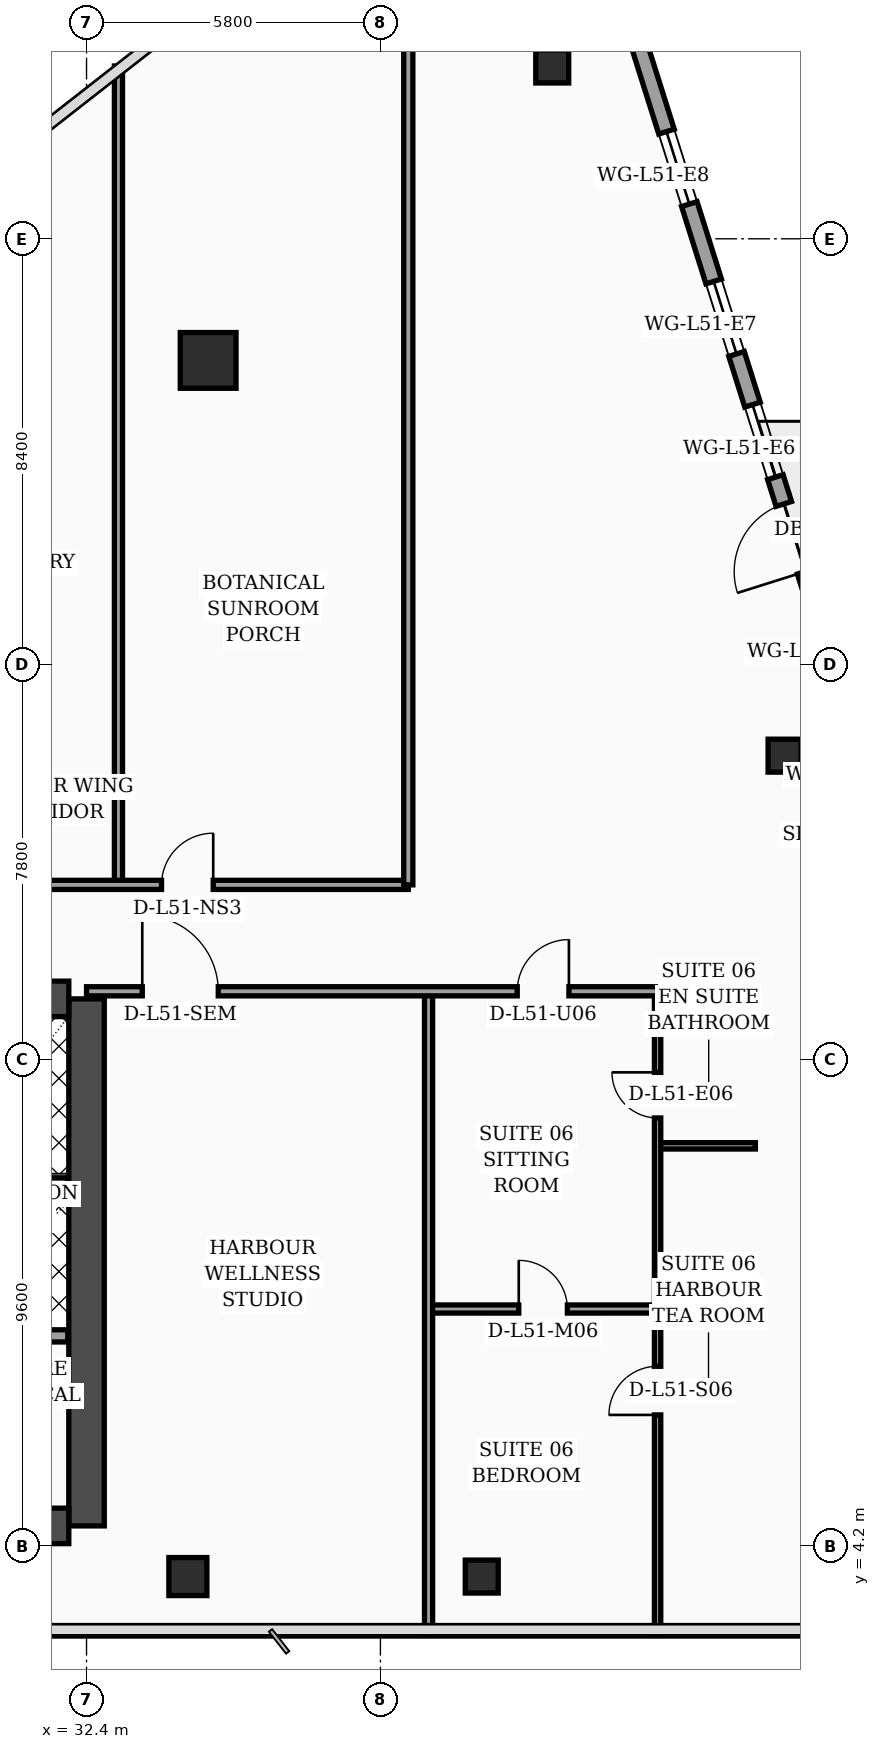
"""IFC4 building model, lengths in metres.
Left out: names, types, materials, properties, quantities, classifications, styles, units other than length and angle.
Written with IfcOpenShell. Run it as: python <this file> out.ifc"""

import sys

from ifc_helpers import new_model, si_unit, direction, frame, frame_2d, origin, origin_2d, place, context, subcontext, project, spatial, rectangle, hollow_rectangle, circle, extrude, element, fill, save


model = new_model("IFC4")
c1 = context("Model", 3, precision=1e-05, world=origin(), true_north=direction((0.0, 1.0)))
c2 = subcontext(c1, "Body", "Model", "MODEL_VIEW")
j1 = project(units=[si_unit("LENGTHUNIT", "METRE"), si_unit("PLANEANGLEUNIT", "RADIAN")], contexts=[c1])
p1 = place(None, origin())
s1 = spatial("IfcSite", under=j1, at=p1, CompositionType="ELEMENT")
p2 = place(p1, origin())
s2 = spatial("IfcBuilding", under=s1, at=p2, CompositionType="ELEMENT")
p3 = place(p2, frame((0.0, 0.0, 207.2)))
s3 = spatial("IfcBuildingStorey", under=s2, at=p3, CompositionType="ELEMENT", Elevation=207.2)
p4 = place(p3, frame((32.4, 4.6, 0.0), z_axis=(0.0, 0.0, 1.0), x_axis=(0.0, 1.0, 0.0)))
e1 = element("IfcWall", 1, at=p4, inside=s3, PredefinedType="SHEAR", context=c2, shape_type="SweptSolid", body=[
    extrude(rectangle(XDim=10.4, YDim=0.7, at=frame_2d((5.2, 0.0))), origin(), (0.0, 0.0, 1.0), 3.56),
])
p5 = place(p3, frame((21.95, 15.0, 0.0), z_axis=(0.0, 0.0, 1.0), x_axis=(1.0, 0.0, 0.0)))
e2 = element("IfcWall", 2, at=p5, inside=s3, PredefinedType="SHEAR", context=c2, shape_type="SweptSolid", body=[
    extrude(rectangle(XDim=10.1, YDim=0.7, at=frame_2d((5.05, 0.0))), origin(), (0.0, 0.0, 1.0), 3.56),
])
p6 = place(p5, frame((4.95, 0.0, 0.0)))
e3 = element("IfcOpeningElement", 3, at=p6, cuts=e2, PredefinedType="OPENING", context=c2, shape_type="SweptSolid", body=[
    extrude(rectangle(XDim=1.1, YDim=2.2, at=frame_2d((0.55, 1.1))), frame((0.0, 0.36, 0.0), z_axis=(0.0, -1.0, 0.0), x_axis=(1.0, 0.0, 0.0)), (0.0, 0.0, 1.0), 0.72),
])
p7 = place(p3, frame((21.95, 4.6, 0.0), z_axis=(0.0, 0.0, 1.0), x_axis=(1.0, 0.0, 0.0)))
e4 = element("IfcWall", 4, at=p7, inside=s3, PredefinedType="SHEAR", context=c2, shape_type="SweptSolid", body=[
    extrude(rectangle(XDim=10.1, YDim=0.7, at=frame_2d((5.05, 0.0))), origin(), (0.0, 0.0, 1.0), 3.56),
])
p8 = place(p3, frame((34.4, 3.6, 0.0), z_axis=(0.0, 0.0, 1.0), x_axis=(1.0, 0.0, 0.0)))
e5 = element("IfcColumn", 5, at=p8, inside=s3, PredefinedType="COLUMN", context=c2, shape_type="SweptSolid", body=[
    extrude(hollow_rectangle(XDim=0.75, YDim=0.75, WallThickness=0.032, at=origin_2d()), origin(), (0.0, 0.0, 1.0), 3.56),
])
p9 = place(p3, frame((40.2, 3.6, 0.0), z_axis=(0.0, 0.0, 1.0), x_axis=(1.0, 0.0, 0.0)))
e6 = element("IfcColumn", 6, at=p9, inside=s3, PredefinedType="COLUMN", context=c2, shape_type="SweptSolid", body=[
    extrude(hollow_rectangle(XDim=0.65, YDim=0.65, WallThickness=0.028, at=origin_2d()), origin(), (0.0, 0.0, 1.0), 3.56),
])
p10 = place(p3, frame((34.8, 27.6, 0.0), z_axis=(0.0, 0.0, 1.0), x_axis=(1.0, 0.0, 0.0)))
e7 = element("IfcColumn", 7, at=p10, inside=s3, PredefinedType="COLUMN", context=c2, shape_type="SweptSolid", body=[
    extrude(circle(Radius=0.55, at=origin_2d()), origin(), (0.0, 0.0, 1.0), 3.56),
])
for number, where, z_axis, x_axis in (
    (8, (46.176, 19.8, 0.0), (0.0, 0.0, 1.0), (1.0, 0.0, 0.0)),
    (9, (41.591, 33.4, 0.0), (0.0, 0.0, 1.0), (1.0, 0.0, 0.0)),
):
    element("IfcColumn", number, at=place(p3, frame(where, z_axis=z_axis, x_axis=x_axis)), inside=s3, PredefinedType="COLUMN", context=c2, shape_type="SweptSolid", body=[
        extrude(hollow_rectangle(XDim=0.65, YDim=0.65, WallThickness=0.028, at=origin_2d()), origin(), (0.0, 0.0, 1.0), 3.56),
    ])
p11 = place(p3, frame((52.23, 5.505, 0.0), z_axis=(0.0, 0.0, 1.0), x_axis=(-0.300509063924, 0.953778958931, 0.0)))
e10 = element("IfcWall", 10, at=p11, inside=s3, PredefinedType="SOLIDWALL", context=c2, shape_type="SweptSolid", body=[
    extrude(rectangle(XDim=30.814, YDim=0.32, at=frame_2d((15.407, 0.0))), origin(), (0.0, 0.0, 1.0), 3.56),
])
p12 = place(p11, frame((18.796, 0.0, 0.0)))
e11 = element("IfcOpeningElement", 11, at=p12, cuts=e10, PredefinedType="OPENING", context=c2, shape_type="SweptSolid", body=[
    extrude(rectangle(XDim=1.4, YDim=2.25, at=frame_2d((0.7, 1.125))), frame((0.0, 0.17, 0.0), z_axis=(0.0, -1.0, 0.0), x_axis=(1.0, 0.0, 0.0)), (0.0, 0.0, 1.0), 0.34),
])
p13 = place(p11, frame((4.437, 0.0, 0.7)))
e12 = element("IfcOpeningElement", 12, at=p13, cuts=e10, PredefinedType="OPENING", context=c2, shape_type="SweptSolid", body=[
    extrude(rectangle(XDim=1.6, YDim=1.65, at=frame_2d((0.8, 0.825))), frame((0.0, 0.17, 0.0), z_axis=(0.0, -1.0, 0.0), x_axis=(1.0, 0.0, 0.0)), (0.0, 0.0, 1.0), 0.34),
])
p14 = place(p11, frame((9.889, 0.0, 0.7)))
e13 = element("IfcOpeningElement", 13, at=p14, cuts=e10, PredefinedType="OPENING", context=c2, shape_type="SweptSolid", body=[
    extrude(rectangle(XDim=1.6, YDim=1.65, at=frame_2d((0.8, 0.825))), frame((0.0, 0.17, 0.0), z_axis=(0.0, -1.0, 0.0), x_axis=(1.0, 0.0, 0.0)), (0.0, 0.0, 1.0), 0.34),
])
p15 = place(p11, frame((1.6, 0.0, 0.75)))
e14 = element("IfcOpeningElement", 14, at=p15, cuts=e10, PredefinedType="OPENING", context=c2, shape_type="SweptSolid", body=[
    extrude(rectangle(XDim=1.5, YDim=1.6, at=frame_2d((0.75, 0.8))), frame((0.0, 0.17, 0.0), z_axis=(0.0, -1.0, 0.0), x_axis=(1.0, 0.0, 0.0)), (0.0, 0.0, 1.0), 0.34),
])
p16 = place(p11, frame((7.8, 0.0, 0.75)))
e15 = element("IfcOpeningElement", 15, at=p16, cuts=e10, PredefinedType="OPENING", context=c2, shape_type="SweptSolid", body=[
    extrude(rectangle(XDim=1.5, YDim=1.6, at=frame_2d((0.75, 0.8))), frame((0.0, 0.17, 0.0), z_axis=(0.0, -1.0, 0.0), x_axis=(1.0, 0.0, 0.0)), (0.0, 0.0, 1.0), 0.34),
])
p17 = place(p11, frame((11.95, 0.0, 0.75)))
e16 = element("IfcOpeningElement", 16, at=p17, cuts=e10, PredefinedType="OPENING", context=c2, shape_type="SweptSolid", body=[
    extrude(rectangle(XDim=1.5, YDim=1.6, at=frame_2d((0.75, 0.8))), frame((0.0, 0.17, 0.0), z_axis=(0.0, -1.0, 0.0), x_axis=(1.0, 0.0, 0.0)), (0.0, 0.0, 1.0), 0.34),
])
p18 = place(p11, frame((14.0, 0.0, 0.75)))
e17 = element("IfcOpeningElement", 17, at=p18, cuts=e10, PredefinedType="OPENING", context=c2, shape_type="SweptSolid", body=[
    extrude(rectangle(XDim=1.5, YDim=1.6, at=frame_2d((0.75, 0.8))), frame((0.0, 0.17, 0.0), z_axis=(0.0, -1.0, 0.0), x_axis=(1.0, 0.0, 0.0)), (0.0, 0.0, 1.0), 0.34),
])
p19 = place(p11, frame((16.55, 0.0, 0.75)))
e18 = element("IfcOpeningElement", 18, at=p19, cuts=e10, PredefinedType="OPENING", context=c2, shape_type="SweptSolid", body=[
    extrude(rectangle(XDim=1.5, YDim=1.6, at=frame_2d((0.75, 0.8))), frame((0.0, 0.17, 0.0), z_axis=(0.0, -1.0, 0.0), x_axis=(1.0, 0.0, 0.0)), (0.0, 0.0, 1.0), 0.34),
])
p20 = place(p11, frame((20.75, 0.0, 0.75)))
e19 = element("IfcOpeningElement", 19, at=p20, cuts=e10, PredefinedType="OPENING", context=c2, shape_type="SweptSolid", body=[
    extrude(rectangle(XDim=1.5, YDim=1.6, at=frame_2d((0.75, 0.8))), frame((0.0, 0.17, 0.0), z_axis=(0.0, -1.0, 0.0), x_axis=(1.0, 0.0, 0.0)), (0.0, 0.0, 1.0), 0.34),
])
p21 = place(p11, frame((23.3, 0.0, 0.75)))
e20 = element("IfcOpeningElement", 20, at=p21, cuts=e10, PredefinedType="OPENING", context=c2, shape_type="SweptSolid", body=[
    extrude(rectangle(XDim=1.5, YDim=1.6, at=frame_2d((0.75, 0.8))), frame((0.0, 0.17, 0.0), z_axis=(0.0, -1.0, 0.0), x_axis=(1.0, 0.0, 0.0)), (0.0, 0.0, 1.0), 0.34),
])
p22 = place(p11, frame((26.4, 0.0, 0.75)))
e21 = element("IfcOpeningElement", 21, at=p22, cuts=e10, PredefinedType="OPENING", context=c2, shape_type="SweptSolid", body=[
    extrude(rectangle(XDim=1.5, YDim=1.6, at=frame_2d((0.75, 0.8))), frame((0.0, 0.17, 0.0), z_axis=(0.0, -1.0, 0.0), x_axis=(1.0, 0.0, 0.0)), (0.0, 0.0, 1.0), 0.34),
])
p23 = place(p3, frame((27.02, 11.35, 0.0), z_axis=(0.0, 0.0, 1.0), x_axis=(1.0, 0.0, 0.0)))
e22 = element("IfcWall", 22, at=p23, inside=s3, PredefinedType="SOLIDWALL", context=c2, shape_type="SweptSolid", body=[
    extrude(rectangle(XDim=5.01, YDim=0.24, at=frame_2d((2.505, 0.0))), origin(), (0.0, 0.0, 1.0), 3.56),
])
p24 = place(p23, frame((0.45, 0.0, 0.0)))
e23 = element("IfcOpeningElement", 23, at=p24, cuts=e22, PredefinedType="OPENING", context=c2, shape_type="SweptSolid", body=[
    extrude(rectangle(XDim=1.3, YDim=2.35, at=frame_2d((0.65, 1.175))), frame((0.0, 0.13, 0.0), z_axis=(0.0, -1.0, 0.0), x_axis=(1.0, 0.0, 0.0)), (0.0, 0.0, 1.0), 0.26),
])
p25 = place(p3, frame((27.02, 8.35, 0.0), z_axis=(0.0, 0.0, 1.0), x_axis=(1.0, 0.0, 0.0)))
e24 = element("IfcWall", 24, at=p25, inside=s3, PredefinedType="SOLIDWALL", context=c2, shape_type="SweptSolid", body=[
    extrude(rectangle(XDim=5.01, YDim=0.24, at=frame_2d((2.505, 0.0))), origin(), (0.0, 0.0, 1.0), 3.56),
])
p26 = place(p3, frame((43.67, 12.1, 0.0), z_axis=(0.0, 0.0, 1.0), x_axis=(1.0, 0.0, 0.0)))
e25 = element("IfcWall", 25, at=p26, inside=s3, PredefinedType="PARTITIONING", context=c2, shape_type="SweptSolid", body=[
    extrude(rectangle(XDim=1.93, YDim=0.125, at=frame_2d((0.965, 0.0))), origin(), (0.0, 0.0, 1.0), 3.56),
])
p27 = place(p3, frame((39.15, 8.88, 0.0), z_axis=(0.0, 0.0, 1.0), x_axis=(1.0, 0.0, 0.0)))
e26 = element("IfcWall", 26, at=p27, inside=s3, PredefinedType="PARTITIONING", context=c2, shape_type="SweptSolid", body=[
    extrude(rectangle(XDim=4.52, YDim=0.16, at=frame_2d((2.26, 0.0))), origin(), (0.0, 0.0, 1.0), 3.56),
])
p28 = place(p27, frame((1.78, 0.0, 0.0)))
e27 = element("IfcOpeningElement", 27, at=p28, cuts=e26, PredefinedType="OPENING", context=c2, shape_type="SweptSolid", body=[
    extrude(rectangle(XDim=0.96, YDim=2.2, at=frame_2d((0.48, 1.1))), frame((0.0, 0.09, 0.0), z_axis=(0.0, -1.0, 0.0), x_axis=(1.0, 0.0, 0.0)), (0.0, 0.0, 1.0), 0.18),
])
p29 = place(p3, frame((43.67, 2.44, 0.0), z_axis=(0.0, 0.0, 1.0), x_axis=(0.0, 1.0, 0.0)))
e28 = element("IfcWall", 28, at=p29, inside=s3, PredefinedType="PARTITIONING", context=c2, shape_type="SweptSolid", body=[
    extrude(rectangle(XDim=12.71, YDim=0.125, at=frame_2d((6.355, 0.0))), origin(), (0.0, 0.0, 1.0), 3.09),
])
p30 = place(p29, frame((4.35, 0.0, 0.0)))
e29 = element("IfcOpeningElement", 29, at=p30, cuts=e28, PredefinedType="OPENING", context=c2, shape_type="SweptSolid", body=[
    extrude(rectangle(XDim=0.96, YDim=2.2, at=frame_2d((0.48, 1.1))), frame((0.0, 0.073, 0.0), z_axis=(0.0, -1.0, 0.0), x_axis=(1.0, 0.0, 0.0)), (0.0, 0.0, 1.0), 0.145),
])
p31 = place(p29, frame((10.21, 0.0, 0.0)))
e30 = element("IfcOpeningElement", 30, at=p31, cuts=e28, PredefinedType="OPENING", context=c2, shape_type="SweptSolid", body=[
    extrude(rectangle(XDim=0.9, YDim=2.15, at=frame_2d((0.45, 1.075))), frame((0.0, 0.073, 0.0), z_axis=(0.0, -1.0, 0.0), x_axis=(1.0, 0.0, 0.0)), (0.0, 0.0, 1.0), 0.145),
])
p32 = place(p3, frame((39.15, 2.44, 0.0), z_axis=(0.0, 0.0, 1.0), x_axis=(0.0, 1.0, 0.0)))
e31 = element("IfcWall", 31, at=p32, inside=s3, PredefinedType="PARTITIONING", context=c2, shape_type="SweptSolid", body=[
    extrude(rectangle(XDim=12.71, YDim=0.16, at=frame_2d((6.355, 0.0))), origin(), (0.0, 0.0, 1.0), 2.94),
])
p33 = place(p3, frame((32.4, 15.15, 0.0), z_axis=(0.0, 0.0, 1.0), x_axis=(1.0, 0.0, 0.0)))
e32 = element("IfcWall", 32, at=p33, inside=s3, PredefinedType="PARTITIONING", context=c2, shape_type="SweptSolid", body=[
    extrude(rectangle(XDim=13.2, YDim=0.18, at=frame_2d((6.6, 0.0))), origin(), (0.0, 0.0, 1.0), 2.94),
])
p34 = place(p33, frame((1.1, 0.0, 0.0)))
e33 = element("IfcOpeningElement", 33, at=p34, cuts=e32, PredefinedType="OPENING", context=c2, shape_type="SweptSolid", body=[
    extrude(rectangle(XDim=1.5, YDim=2.22, at=frame_2d((0.75, 1.11))), frame((0.0, 0.1, 0.0), z_axis=(0.0, -1.0, 0.0), x_axis=(1.0, 0.0, 0.0)), (0.0, 0.0, 1.0), 0.2),
])
p35 = place(p33, frame((8.5, 0.0, 0.0)))
e34 = element("IfcOpeningElement", 34, at=p35, cuts=e32, PredefinedType="OPENING", context=c2, shape_type="SweptSolid", body=[
    extrude(rectangle(XDim=1.02, YDim=2.2, at=frame_2d((0.51, 1.1))), frame((0.0, 0.1, 0.0), z_axis=(0.0, -1.0, 0.0), x_axis=(1.0, 0.0, 0.0)), (0.0, 0.0, 1.0), 0.2),
])
p36 = place(p3, frame((33.03, 17.25, 0.0), z_axis=(0.0, 0.0, 1.0), x_axis=(0.0, 1.0, 0.0)))
e35 = element("IfcWall", 35, at=p36, inside=s3, PredefinedType="PARTITIONING", context=c2, shape_type="SweptSolid", body=[
    extrude(rectangle(XDim=16.16, YDim=0.16, at=frame_2d((8.08, 0.0))), origin(), (0.0, 0.0, 1.0), 2.94),
])
p37 = place(p3, frame((21.5, 17.25, 0.0), z_axis=(0.0, 0.0, 1.0), x_axis=(1.0, 0.0, 0.0)))
e36 = element("IfcWall", 36, at=p37, inside=s3, PredefinedType="PARTITIONING", context=c2, shape_type="SweptSolid", body=[
    extrude(rectangle(XDim=17.25, YDim=0.18, at=frame_2d((8.625, 0.0))), origin(), (0.0, 0.0, 1.0), 2.94),
])
p38 = place(p37, frame((0.95, 0.0, 0.0)))
e37 = element("IfcOpeningElement", 37, at=p38, cuts=e36, PredefinedType="OPENING", context=c2, shape_type="SweptSolid", body=[
    extrude(rectangle(XDim=1.02, YDim=2.2, at=frame_2d((0.51, 1.1))), frame((0.0, 0.1, 0.0), z_axis=(0.0, -1.0, 0.0), x_axis=(1.0, 0.0, 0.0)), (0.0, 0.0, 1.0), 0.2),
])
p39 = place(p37, frame((7.32, 0.0, 0.0)))
e38 = element("IfcOpeningElement", 38, at=p39, cuts=e36, PredefinedType="OPENING", context=c2, shape_type="SweptSolid", body=[
    extrude(rectangle(XDim=1.02, YDim=2.2, at=frame_2d((0.51, 1.1))), frame((0.0, 0.1, 0.0), z_axis=(0.0, -1.0, 0.0), x_axis=(1.0, 0.0, 0.0)), (0.0, 0.0, 1.0), 0.2),
])
p40 = place(p37, frame((12.38, 0.0, 0.0)))
e39 = element("IfcOpeningElement", 39, at=p40, cuts=e36, PredefinedType="OPENING", context=c2, shape_type="SweptSolid", body=[
    extrude(rectangle(XDim=1.02, YDim=2.2, at=frame_2d((0.51, 1.1))), frame((0.0, 0.1, 0.0), z_axis=(0.0, -1.0, 0.0), x_axis=(1.0, 0.0, 0.0)), (0.0, 0.0, 1.0), 0.2),
])
p41 = place(p3, frame((38.75, 17.25, 0.0), z_axis=(0.0, 0.0, 1.0), x_axis=(0.0, 1.0, 0.0)))
e40 = element("IfcWall", 40, at=p41, inside=s3, PredefinedType="PARTITIONING", context=c2, shape_type="SweptSolid", body=[
    extrude(rectangle(XDim=20.63, YDim=0.18, at=frame_2d((10.315, 0.0))), origin(), (0.0, 0.0, 1.0), 2.94),
])
p42 = place(p12, origin())
e41 = element("IfcDoor", 41, at=p42, inside=s3, OperationType="SINGLE_SWING_LEFT", PredefinedType="DOOR", context=c2, shape_type="SweptSolid", body=[
    extrude(rectangle(XDim=1.4, YDim=2.25, at=frame_2d((0.7, 1.125))), frame((0.0, 0.025, 0.0), z_axis=(0.0, -1.0, 0.0), x_axis=(1.0, 0.0, 0.0)), (0.0, 0.0, 1.0), 0.05),
])
fill(e11, e41)
p43 = place(p20, origin())
e42 = element("IfcWindow", 42, at=p43, inside=s3, PartitioningType="SINGLE_PANEL", PredefinedType="WINDOW", context=c2, shape_type="SweptSolid", body=[
    extrude(rectangle(XDim=1.5, YDim=1.6, at=frame_2d((0.75, 0.8))), frame((0.0, 0.03, 0.0), z_axis=(0.0, -1.0, 0.0), x_axis=(1.0, 0.0, 0.0)), (0.0, 0.0, 1.0), 0.06),
])
fill(e19, e42)
p44 = place(p21, origin())
e43 = element("IfcWindow", 43, at=p44, inside=s3, PartitioningType="SINGLE_PANEL", PredefinedType="WINDOW", context=c2, shape_type="SweptSolid", body=[
    extrude(rectangle(XDim=1.5, YDim=1.6, at=frame_2d((0.75, 0.8))), frame((0.0, 0.03, 0.0), z_axis=(0.0, -1.0, 0.0), x_axis=(1.0, 0.0, 0.0)), (0.0, 0.0, 1.0), 0.06),
])
fill(e20, e43)
p45 = place(p22, origin())
e44 = element("IfcWindow", 44, at=p45, inside=s3, PartitioningType="SINGLE_PANEL", PredefinedType="WINDOW", context=c2, shape_type="SweptSolid", body=[
    extrude(rectangle(XDim=1.5, YDim=1.6, at=frame_2d((0.75, 0.8))), frame((0.0, 0.03, 0.0), z_axis=(0.0, -1.0, 0.0), x_axis=(1.0, 0.0, 0.0)), (0.0, 0.0, 1.0), 0.06),
])
fill(e21, e44)
p46 = place(p28, origin())
e45 = element("IfcDoor", 45, at=p46, inside=s3, OperationType="SINGLE_SWING_LEFT", PredefinedType="DOOR", context=c2, shape_type="SweptSolid", body=[
    extrude(rectangle(XDim=0.96, YDim=2.2, at=frame_2d((0.48, 1.1))), frame((0.0, 0.025, 0.0), z_axis=(0.0, -1.0, 0.0), x_axis=(1.0, 0.0, 0.0)), (0.0, 0.0, 1.0), 0.05),
])
fill(e27, e45)
p47 = place(p30, origin())
e46 = element("IfcDoor", 46, at=p47, inside=s3, OperationType="SINGLE_SWING_LEFT", PredefinedType="DOOR", context=c2, shape_type="SweptSolid", body=[
    extrude(rectangle(XDim=0.96, YDim=2.2, at=frame_2d((0.48, 1.1))), frame((0.0, 0.025, 0.0), z_axis=(0.0, -1.0, 0.0), x_axis=(1.0, 0.0, 0.0)), (0.0, 0.0, 1.0), 0.05),
])
fill(e29, e46)
p48 = place(p31, origin())
e47 = element("IfcDoor", 47, at=p48, inside=s3, OperationType="SINGLE_SWING_RIGHT", PredefinedType="DOOR", context=c2, shape_type="SweptSolid", body=[
    extrude(rectangle(XDim=0.9, YDim=2.15, at=frame_2d((0.45, 1.075))), frame((0.0, 0.025, 0.0), z_axis=(0.0, -1.0, 0.0), x_axis=(1.0, 0.0, 0.0)), (0.0, 0.0, 1.0), 0.05),
])
fill(e30, e47)
p49 = place(p34, origin())
e48 = element("IfcDoor", 48, at=p49, inside=s3, OperationType="SINGLE_SWING_LEFT", PredefinedType="DOOR", context=c2, shape_type="SweptSolid", body=[
    extrude(rectangle(XDim=1.5, YDim=2.22, at=frame_2d((0.75, 1.11))), frame((0.0, 0.025, 0.0), z_axis=(0.0, -1.0, 0.0), x_axis=(1.0, 0.0, 0.0)), (0.0, 0.0, 1.0), 0.05),
])
fill(e33, e48)
p50 = place(p35, origin())
e49 = element("IfcDoor", 49, at=p50, inside=s3, OperationType="SINGLE_SWING_RIGHT", PredefinedType="DOOR", context=c2, shape_type="SweptSolid", body=[
    extrude(rectangle(XDim=1.02, YDim=2.2, at=frame_2d((0.51, 1.1))), frame((0.0, 0.025, 0.0), z_axis=(0.0, -1.0, 0.0), x_axis=(1.0, 0.0, 0.0)), (0.0, 0.0, 1.0), 0.05),
])
fill(e34, e49)
p51 = place(p40, origin())
e50 = element("IfcDoor", 50, at=p51, inside=s3, OperationType="SINGLE_SWING_RIGHT", PredefinedType="DOOR", context=c2, shape_type="SweptSolid", body=[
    extrude(rectangle(XDim=1.02, YDim=2.2, at=frame_2d((0.51, 1.1))), frame((0.0, 0.025, 0.0), z_axis=(0.0, -1.0, 0.0), x_axis=(1.0, 0.0, 0.0)), (0.0, 0.0, 1.0), 0.05),
])
fill(e39, e50)
save(model, sys.argv[1])
